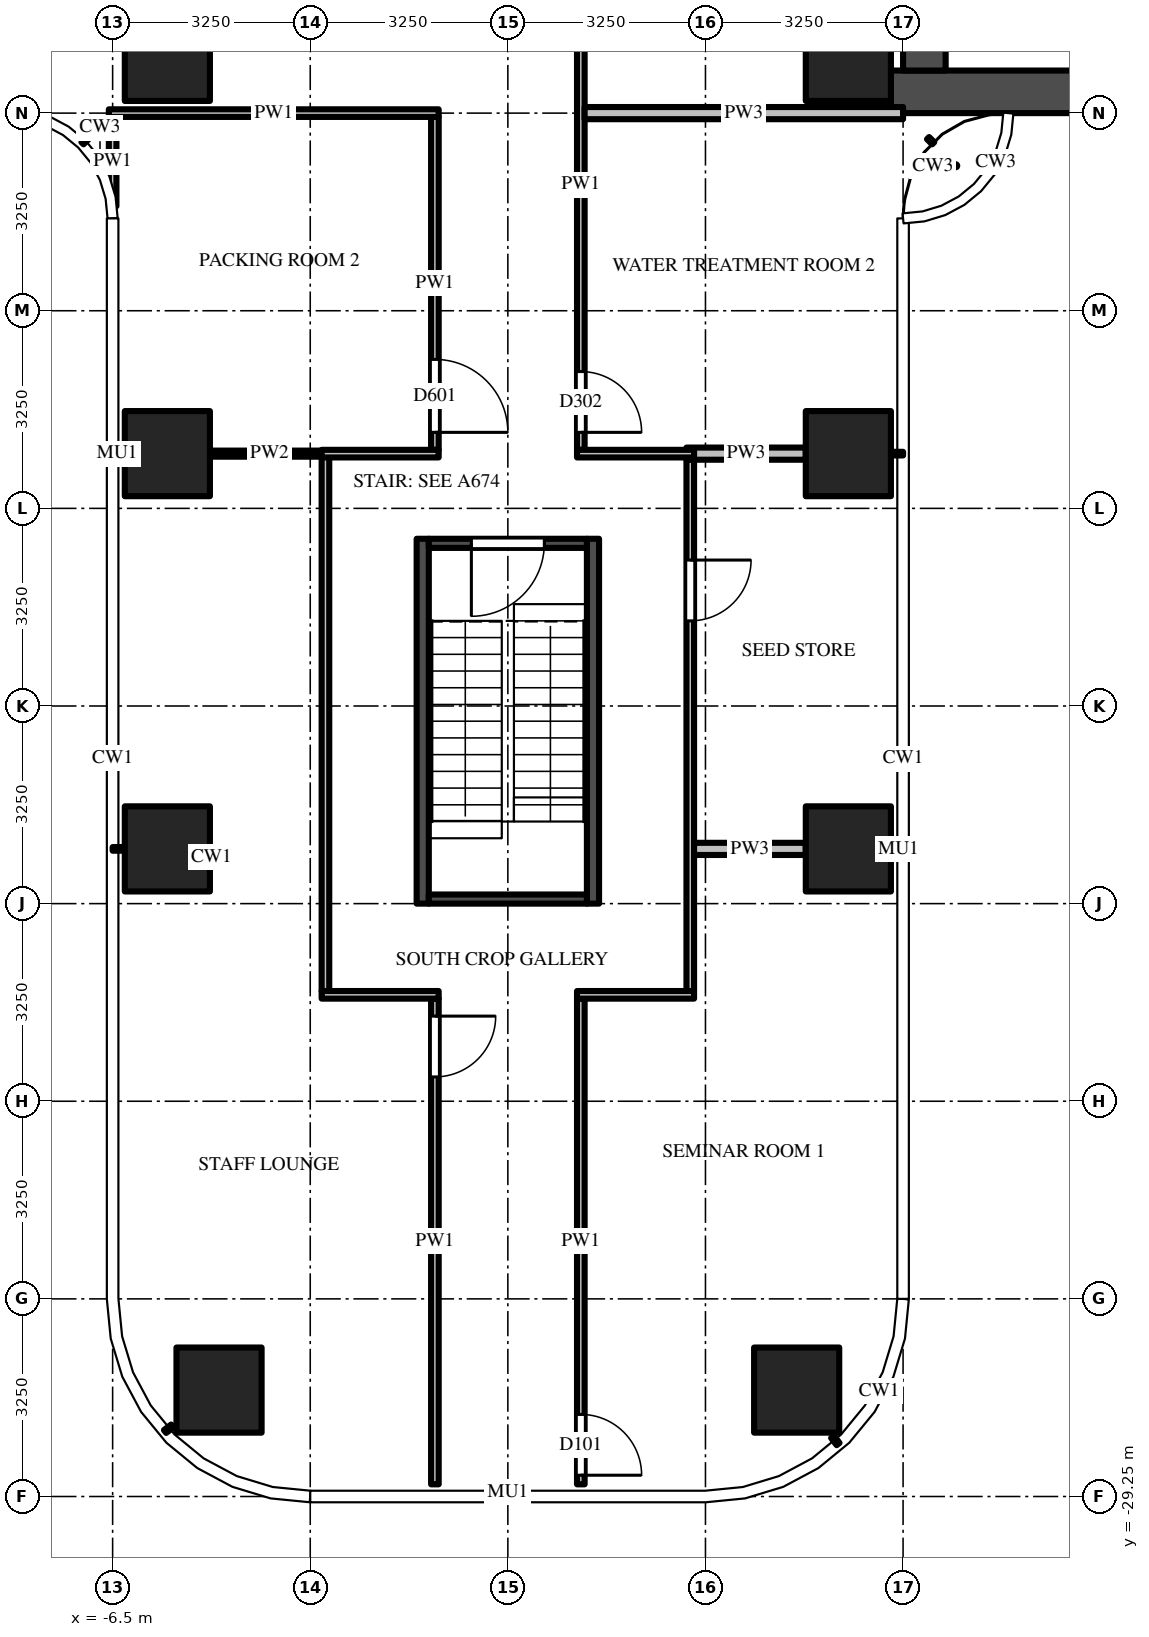
"""IFC4 building model, lengths in metres.
Left out: names, types, materials, properties, quantities, classifications, styles, units other than length and angle.
Written with IfcOpenShell. Run it as: python <this file> out.ifc"""

import sys

from ifc_helpers import new_model, si_unit, direction, frame, frame_2d, origin, origin_2d, place, context, subcontext, project, spatial, polyline, rectangle, outline, extrude, source, transform, mapped, element, fill, save


model = new_model("IFC4")
c1 = context("Model", 3, precision=1e-05, world=origin(), true_north=direction((0.0, 1.0)))
c2 = subcontext(c1, "Body", "Model", "MODEL_VIEW")
j1 = project(units=[si_unit("LENGTHUNIT", "METRE"), si_unit("PLANEANGLEUNIT", "RADIAN")], contexts=[c1])
p1 = place(None, origin())
s1 = spatial("IfcSite", under=j1, at=p1, CompositionType="ELEMENT")
p2 = place(p1, origin())
s2 = spatial("IfcBuilding", under=s1, at=p2, CompositionType="ELEMENT")
p3 = place(p2, frame((0.0, 0.0, 79.0)))
s3 = spatial("IfcBuildingStorey", under=s2, at=p3, CompositionType="ELEMENT", Elevation=79.0)
m1 = source(origin(), c2, "Body", "SweptSolid", [
    extrude(rectangle(XDim=1.4, YDim=1.4, at=origin_2d()), origin(), (0.0, 0.0, 1.0), 4.5),
])
for number, where, z_axis, x_axis in (
    (1, (5.6, -5.6, 0.0), (0.0, 0.0, 1.0), (1.0, 0.0, 0.0)),
    (2, (-5.6, -5.6, 0.0), (0.0, 0.0, 1.0), (1.0, 0.0, 0.0)),
    (3, (5.6, -12.1, 0.0), (0.0, 0.0, 1.0), (1.0, 0.0, 0.0)),
    (4, (5.6, -18.6, 0.0), (0.0, 0.0, 1.0), (1.0, 0.0, 0.0)),
    (5, (4.75, -27.5, 0.0), (0.0, 0.0, 1.0), (1.0, 0.0, 0.0)),
    (6, (-5.6, -12.1, 0.0), (0.0, 0.0, 1.0), (1.0, 0.0, 0.0)),
    (7, (-5.6, -18.6, 0.0), (0.0, 0.0, 1.0), (1.0, 0.0, 0.0)),
    (8, (-4.75, -27.5, 0.0), (0.0, 0.0, 1.0), (1.0, 0.0, 0.0)),
):
    element("IfcColumn", number, at=place(p3, frame(where, z_axis=z_axis, x_axis=x_axis)), inside=s3, PredefinedType="COLUMN", context=c2, shape_type="MappedRepresentation", body=[
        mapped(m1, transform((0.0, 0.0, 0.0))),
    ])
m2 = source(origin(), c2, "Body", "SweptSolid", [
    extrude(rectangle(XDim=16.45, YDim=0.7, at=frame_2d((8.225, 0.0))), origin(), (0.0, 0.0, 1.0), 4.25),
])
p4 = place(p3, frame((6.3, -6.15, 0.0), z_axis=(0.0, 0.0, 1.0), x_axis=(1.0, 0.0, 0.0)))
e9 = element("IfcWall", 9, at=p4, inside=s3, PredefinedType="SHEAR", context=c2, shape_type="MappedRepresentation", body=[
    mapped(m2, transform((0.0, 0.0, 0.0))),
])
m3 = source(origin(), c2, "Body", "SweptSolid", [
    extrude(rectangle(XDim=9.05, YDim=0.7, at=frame_2d((4.525, 0.0))), origin(), (0.0, 0.0, 1.0), 4.25),
])
p5 = place(p3, frame((6.85, -5.8, 0.0), z_axis=(0.0, 0.0, 1.0), x_axis=(0.0, 1.0, 0.0)))
e10 = element("IfcWall", 10, at=p5, inside=s3, PredefinedType="SHEAR", context=c2, shape_type="MappedRepresentation", body=[
    mapped(m3, transform((0.0, 0.0, 0.0))),
])
m4 = source(origin(), c2, "Body", "SweptSolid", [
    extrude(rectangle(XDim=1.8, YDim=2.1, at=frame_2d((0.9, 1.05))), frame((0.0, 0.36, 0.0), z_axis=(0.0, -1.0, 0.0), x_axis=(1.0, 0.0, 0.0)), (0.0, 0.0, 1.0), 0.72),
])
p6 = place(p5, frame((3.15, 0.0, 0.0)))
e11 = element("IfcOpeningElement", 11, at=p6, cuts=e10, PredefinedType="OPENING", context=c2, shape_type="MappedRepresentation", body=[
    mapped(m4, transform((0.0, 0.0, 0.0))),
])
m5 = source(origin(), c2, "Body", "SweptSolid", [
    extrude(rectangle(XDim=6.0, YDim=0.2, at=frame_2d((3.0, 0.0))), origin(), (0.0, 0.0, 1.0), 4.25),
])
for number, where, z_axis, x_axis in (
    (12, (1.4, -13.5, 0.0), (0.0, 0.0, 1.0), (0.0, -1.0, 0.0)),
    (13, (-1.4, -13.5, 0.0), (0.0, 0.0, 1.0), (0.0, -1.0, 0.0)),
):
    element("IfcWall", number, at=place(p3, frame(where, z_axis=z_axis, x_axis=x_axis)), inside=s3, PredefinedType="SHEAR", context=c2, shape_type="MappedRepresentation", body=[
        mapped(m5, transform((0.0, 0.0, 0.0))),
    ])
m6 = source(origin(), c2, "Body", "SweptSolid", [
    extrude(rectangle(XDim=2.6, YDim=0.15, at=frame_2d((1.3, 0.0))), origin(), (0.0, 0.0, 1.0), 4.25),
])
p7 = place(p3, frame((1.3, -13.575, 0.0), z_axis=(0.0, 0.0, 1.0), x_axis=(-1.0, 0.0, 0.0)))
e14 = element("IfcWall", 14, at=p7, inside=s3, PredefinedType="SHEAR", context=c2, shape_type="MappedRepresentation", body=[
    mapped(m6, transform((0.0, 0.0, 0.0))),
])
m7 = source(origin(), c2, "Body", "SweptSolid", [
    extrude(rectangle(XDim=1.2, YDim=2.1, at=frame_2d((0.6, 1.05))), frame((0.0, 0.085, 0.0), z_axis=(0.0, -1.0, 0.0), x_axis=(1.0, 0.0, 0.0)), (0.0, 0.0, 1.0), 0.17),
])
p8 = place(p7, frame((0.7, 0.0, 0.0)))
e15 = element("IfcOpeningElement", 15, at=p8, cuts=e14, PredefinedType="OPENING", context=c2, shape_type="MappedRepresentation", body=[
    mapped(m7, transform((0.0, 0.0, 0.0))),
])
p9 = place(p3, frame((1.3, -19.425, 0.0), z_axis=(0.0, 0.0, 1.0), x_axis=(-1.0, 0.0, 0.0)))
e16 = element("IfcWall", 16, at=p9, inside=s3, PredefinedType="SHEAR", context=c2, shape_type="MappedRepresentation", body=[
    mapped(m6, transform((0.0, 0.0, 0.0))),
])
p10 = place(p3, origin())
e17 = element("IfcWall", 17, at=p10, inside=s3, PredefinedType="USERDEFINED", context=c2, shape_type="SweptSolid", body=[
    extrude(outline(polyline([(-6.925, -30.162), (-8.077, -28.898), (-8.61, -27.276), (-8.584, -26.971), (-7.986, -27.022), (-8.002, -27.205), (-7.547, -28.589), (-6.564, -29.667), (-6.171, -29.847), (-6.42, -30.393), (-6.925, -30.162)])), origin(), (0.0, 0.0, 1.0), 0.5),
])
e18 = element("IfcWall", 18, at=p10, inside=s3, PredefinedType="USERDEFINED", context=c2, shape_type="SweptSolid", body=[
    extrude(outline(polyline([(8.887, -24.945), (8.742, -26.003), (8.681, -26.166), (8.119, -25.955), (8.156, -25.855), (8.285, -24.913), (8.262, -24.111), (8.106, -23.359), (8.694, -23.237), (8.86, -24.041), (8.887, -24.945)])), origin(), (0.0, 0.0, 1.0), 0.5),
])
m8 = source(origin(), c2, "Body", "SweptSolid", [
    extrude(rectangle(XDim=1.469, YDim=0.125, at=frame_2d((0.734, 0.0))), origin(), (0.0, 0.0, 1.0), 4.25),
])
p11 = place(p3, frame((-6.5, -6.562, 0.0), z_axis=(0.0, 0.0, 1.0), x_axis=(0.0, -1.0, 0.0)))
e19 = element("IfcWall", 19, at=p11, inside=s3, PredefinedType="PARTITIONING", context=c2, shape_type="MappedRepresentation", body=[
    mapped(m8, transform((0.0, 0.0, 0.0))),
])
m9 = source(origin(), c2, "Body", "SweptSolid", [
    extrude(rectangle(XDim=8.788, YDim=0.125, at=frame_2d((4.394, 0.0))), origin(), (0.0, 0.0, 1.0), 3.468),
])
p12 = place(p3, frame((-3.0, -20.938, 0.0), z_axis=(0.0, 0.0, 1.0), x_axis=(0.0, 1.0, 0.0)))
e20 = element("IfcWall", 20, at=p12, inside=s3, PredefinedType="PARTITIONING", context=c2, shape_type="MappedRepresentation", body=[
    mapped(m9, transform((0.0, 0.0, 0.0))),
])
m10 = source(origin(), c2, "Body", "SweptSolid", [
    extrude(rectangle(XDim=7.988, YDim=0.125, at=frame_2d((3.994, 0.0))), origin(), (0.0, 0.0, 1.0), 3.33),
])
p13 = place(p3, frame((-1.2, -21.062, 0.0), z_axis=(0.0, 0.0, 1.0), x_axis=(0.0, -1.0, 0.0)))
e21 = element("IfcWall", 21, at=p13, inside=s3, PredefinedType="PARTITIONING", context=c2, shape_type="MappedRepresentation", body=[
    mapped(m10, transform((0.0, 0.0, 0.0))),
])
m11 = source(origin(), c2, "Body", "SweptSolid", [
    extrude(rectangle(XDim=1.0, YDim=2.1, at=frame_2d((0.5, 1.05))), frame((0.0, 0.073, 0.0), z_axis=(0.0, -1.0, 0.0), x_axis=(1.0, 0.0, 0.0)), (0.0, 0.0, 1.0), 0.145),
])
p14 = place(p13, frame((0.288, 0.0, 0.0)))
e22 = element("IfcOpeningElement", 22, at=p14, cuts=e21, PredefinedType="OPENING", context=c2, shape_type="MappedRepresentation", body=[
    mapped(m11, transform((0.0, 0.0, 0.0))),
])
m12 = source(origin(), c2, "Body", "SweptSolid", [
    extrude(rectangle(XDim=5.475, YDim=0.125, at=frame_2d((2.738, 0.0))), origin(), (0.0, 0.0, 1.0), 3.468),
])
p15 = place(p3, frame((-1.2, -6.562, 0.0), z_axis=(0.0, 0.0, 1.0), x_axis=(0.0, -1.0, 0.0)))
e23 = element("IfcWall", 23, at=p15, inside=s3, PredefinedType="PARTITIONING", context=c2, shape_type="MappedRepresentation", body=[
    mapped(m12, transform((0.0, 0.0, 0.0))),
])
m13 = source(origin(), c2, "Body", "SweptSolid", [
    extrude(rectangle(XDim=1.2, YDim=2.1, at=frame_2d((0.6, 1.05))), frame((0.0, 0.073, 0.0), z_axis=(0.0, -1.0, 0.0), x_axis=(1.0, 0.0, 0.0)), (0.0, 0.0, 1.0), 0.145),
])
p16 = place(p15, frame((3.988, 0.0, 0.0)))
e24 = element("IfcOpeningElement", 24, at=p16, cuts=e23, PredefinedType="OPENING", context=c2, shape_type="MappedRepresentation", body=[
    mapped(m13, transform((0.0, 0.0, 0.0))),
])
p17 = place(p3, frame((1.2, -21.062, 0.0), z_axis=(0.0, 0.0, 1.0), x_axis=(0.0, -1.0, 0.0)))
e25 = element("IfcWall", 25, at=p17, inside=s3, PredefinedType="PARTITIONING", context=c2, shape_type="MappedRepresentation", body=[
    mapped(m10, transform((0.0, 0.0, 0.0))),
])
p18 = place(p17, frame((6.837, 0.0, 0.0)))
e26 = element("IfcOpeningElement", 26, at=p18, cuts=e25, PredefinedType="OPENING", context=c2, shape_type="MappedRepresentation", body=[
    mapped(m11, transform((0.0, 0.0, 0.0))),
])
m14 = source(origin(), c2, "Body", "SweptSolid", [
    extrude(rectangle(XDim=8.725, YDim=0.125, at=frame_2d((4.363, 0.0))), origin(), (0.0, 0.0, 1.0), 3.468),
])
p19 = place(p3, frame((1.2, -3.312, 0.0), z_axis=(0.0, 0.0, 1.0), x_axis=(0.0, -1.0, 0.0)))
e27 = element("IfcWall", 27, at=p19, inside=s3, PredefinedType="PARTITIONING", context=c2, shape_type="MappedRepresentation", body=[
    mapped(m14, transform((0.0, 0.0, 0.0))),
])
p20 = place(p19, frame((7.438, 0.0, 0.0)))
e28 = element("IfcOpeningElement", 28, at=p20, cuts=e27, PredefinedType="OPENING", context=c2, shape_type="MappedRepresentation", body=[
    mapped(m11, transform((0.0, 0.0, 0.0))),
])
m15 = source(origin(), c2, "Body", "SweptSolid", [
    extrude(rectangle(XDim=8.738, YDim=0.125, at=frame_2d((4.369, 0.0))), origin(), (0.0, 0.0, 1.0), 3.468),
])
p21 = place(p3, frame((3.0, -12.2, 0.0), z_axis=(0.0, 0.0, 1.0), x_axis=(0.0, -1.0, 0.0)))
e29 = element("IfcWall", 29, at=p21, inside=s3, PredefinedType="PARTITIONING", context=c2, shape_type="MappedRepresentation", body=[
    mapped(m15, transform((0.0, 0.0, 0.0))),
])
p22 = place(p21, frame((1.65, 0.0, 0.0)))
e30 = element("IfcOpeningElement", 30, at=p22, cuts=e29, PredefinedType="OPENING", context=c2, shape_type="MappedRepresentation", body=[
    mapped(m11, transform((0.0, 0.0, 0.0))),
])
m16 = source(origin(), c2, "Body", "SweptSolid", [
    extrude(rectangle(XDim=1.925, YDim=0.125, at=frame_2d((0.962, 0.0))), origin(), (0.0, 0.0, 1.0), 4.25),
])
for number, where, z_axis, x_axis in (
    (31, (-1.137, -21.0, 0.0), (0.0, 0.0, 1.0), (-1.0, 0.0, 0.0)),
    (32, (3.062, -21.0, 0.0), (0.0, 0.0, 1.0), (-1.0, 0.0, 0.0)),
):
    element("IfcWall", number, at=place(p3, frame(where, z_axis=z_axis, x_axis=x_axis)), inside=s3, PredefinedType="PARTITIONING", context=c2, shape_type="MappedRepresentation", body=[
        mapped(m16, transform((0.0, 0.0, 0.0))),
    ])
m17 = source(origin(), c2, "Body", "SweptSolid", [
    extrude(rectangle(XDim=1.837, YDim=0.2, at=frame_2d((0.919, 0.0))), origin(), (0.0, 0.0, 1.0), 3.697),
])
p23 = place(p3, frame((3.062, -18.6, 0.0), z_axis=(0.0, 0.0, 1.0), x_axis=(1.0, 0.0, 0.0)))
e33 = element("IfcWall", 33, at=p23, inside=s3, PredefinedType="PARTITIONING", context=c2, shape_type="MappedRepresentation", body=[
    mapped(m17, transform((0.0, 0.0, 0.0))),
])
m18 = source(origin(), c2, "Body", "SweptSolid", [
    extrude(rectangle(XDim=1.962, YDim=0.2, at=frame_2d((0.981, 0.0))), origin(), (0.0, 0.0, 1.0), 3.468),
])
p24 = place(p3, frame((2.938, -12.1, 0.0), z_axis=(0.0, 0.0, 1.0), x_axis=(1.0, 0.0, 0.0)))
e34 = element("IfcWall", 34, at=p24, inside=s3, PredefinedType="PARTITIONING", context=c2, shape_type="MappedRepresentation", body=[
    mapped(m18, transform((0.0, 0.0, 0.0))),
])
m19 = source(origin(), c2, "Body", "SweptSolid", [
    extrude(rectangle(XDim=1.962, YDim=0.1, at=frame_2d((0.981, 0.0))), origin(), (0.0, 0.0, 1.0), 3.468),
])
p25 = place(p3, frame((-4.9, -12.1, 0.0), z_axis=(0.0, 0.0, 1.0), x_axis=(1.0, 0.0, 0.0)))
e35 = element("IfcWall", 35, at=p25, inside=s3, PredefinedType="PARTITIONING", context=c2, shape_type="MappedRepresentation", body=[
    mapped(m19, transform((0.0, 0.0, 0.0))),
])
m20 = source(origin(), c2, "Body", "SweptSolid", [
    extrude(rectangle(XDim=1.925, YDim=0.125, at=frame_2d((0.962, 0.0))), origin(), (0.0, 0.0, 1.0), 3.468),
])
for number, where, z_axis, x_axis in (
    (36, (-3.062, -12.1, 0.0), (0.0, 0.0, 1.0), (1.0, 0.0, 0.0)),
    (37, (1.137, -12.1, 0.0), (0.0, 0.0, 1.0), (1.0, 0.0, 0.0)),
):
    element("IfcWall", number, at=place(p3, frame(where, z_axis=z_axis, x_axis=x_axis)), inside=s3, PredefinedType="PARTITIONING", context=c2, shape_type="MappedRepresentation", body=[
        mapped(m20, transform((0.0, 0.0, 0.0))),
    ])
m21 = source(origin(), c2, "Body", "SweptSolid", [
    extrude(rectangle(XDim=5.238, YDim=0.2, at=frame_2d((2.619, 0.0))), origin(), (0.0, 0.0, 1.0), 3.33),
])
p26 = place(p3, frame((1.262, -6.5, 0.0), z_axis=(0.0, 0.0, 1.0), x_axis=(1.0, 0.0, 0.0)))
e38 = element("IfcWall", 38, at=p26, inside=s3, PredefinedType="PARTITIONING", context=c2, shape_type="MappedRepresentation", body=[
    mapped(m21, transform((0.0, 0.0, 0.0))),
])
m22 = source(origin(), c2, "Body", "SweptSolid", [
    extrude(rectangle(XDim=5.425, YDim=0.125, at=frame_2d((2.712, 0.0))), origin(), (0.0, 0.0, 1.0), 3.33),
])
p27 = place(p3, frame((-1.137, -6.5, 0.0), z_axis=(0.0, 0.0, 1.0), x_axis=(-1.0, 0.0, 0.0)))
e39 = element("IfcWall", 39, at=p27, inside=s3, PredefinedType="PARTITIONING", context=c2, shape_type="MappedRepresentation", body=[
    mapped(m22, transform((0.0, 0.0, 0.0))),
])
m23 = source(origin(), c2, "Body", "SweptSolid", [
    extrude(rectangle(XDim=1.2, YDim=2.1, at=frame_2d((0.6, 1.05))), frame((0.0, 0.025, 0.0), z_axis=(0.0, -1.0, 0.0), x_axis=(1.0, 0.0, 0.0)), (0.0, 0.0, 1.0), 0.05),
])
p28 = place(p8, origin())
e40 = element("IfcDoor", 40, at=p28, inside=s3, OperationType="SINGLE_SWING_RIGHT", PredefinedType="DOOR", context=c2, shape_type="MappedRepresentation", body=[
    mapped(m23, transform((0.0, 0.0, 0.0))),
])
fill(e15, e40)
m24 = source(origin(), c2, "Body", "SweptSolid", [
    extrude(rectangle(XDim=1.0, YDim=2.1, at=frame_2d((0.5, 1.05))), frame((0.0, 0.025, 0.0), z_axis=(0.0, -1.0, 0.0), x_axis=(1.0, 0.0, 0.0)), (0.0, 0.0, 1.0), 0.05),
])
p29 = place(p18, origin())
e41 = element("IfcDoor", 41, at=p29, inside=s3, OperationType="SINGLE_SWING_RIGHT", PredefinedType="DOOR", context=c2, shape_type="MappedRepresentation", body=[
    mapped(m24, transform((0.0, 0.0, 0.0))),
])
fill(e26, e41)
p30 = place(p14, origin())
e42 = element("IfcDoor", 42, at=p30, inside=s3, OperationType="SINGLE_SWING_LEFT", PredefinedType="DOOR", context=c2, shape_type="MappedRepresentation", body=[
    mapped(m24, transform((0.0, 0.0, 0.0))),
])
fill(e22, e42)
p31 = place(p22, origin())
e43 = element("IfcDoor", 43, at=p31, inside=s3, OperationType="SINGLE_SWING_LEFT", PredefinedType="DOOR", context=c2, shape_type="MappedRepresentation", body=[
    mapped(m24, transform((0.0, 0.0, 0.0))),
])
fill(e30, e43)
p32 = place(p20, origin())
e44 = element("IfcDoor", 44, at=p32, inside=s3, OperationType="SINGLE_SWING_RIGHT", PredefinedType="DOOR", context=c2, shape_type="MappedRepresentation", body=[
    mapped(m24, transform((0.0, 0.0, 0.0))),
])
fill(e28, e44)
p33 = place(p16, origin())
e45 = element("IfcDoor", 45, at=p33, inside=s3, OperationType="SINGLE_SWING_RIGHT", PredefinedType="DOOR", context=c2, shape_type="MappedRepresentation", body=[
    mapped(m23, transform((0.0, 0.0, 0.0))),
])
fill(e24, e45)
save(model, sys.argv[1])
